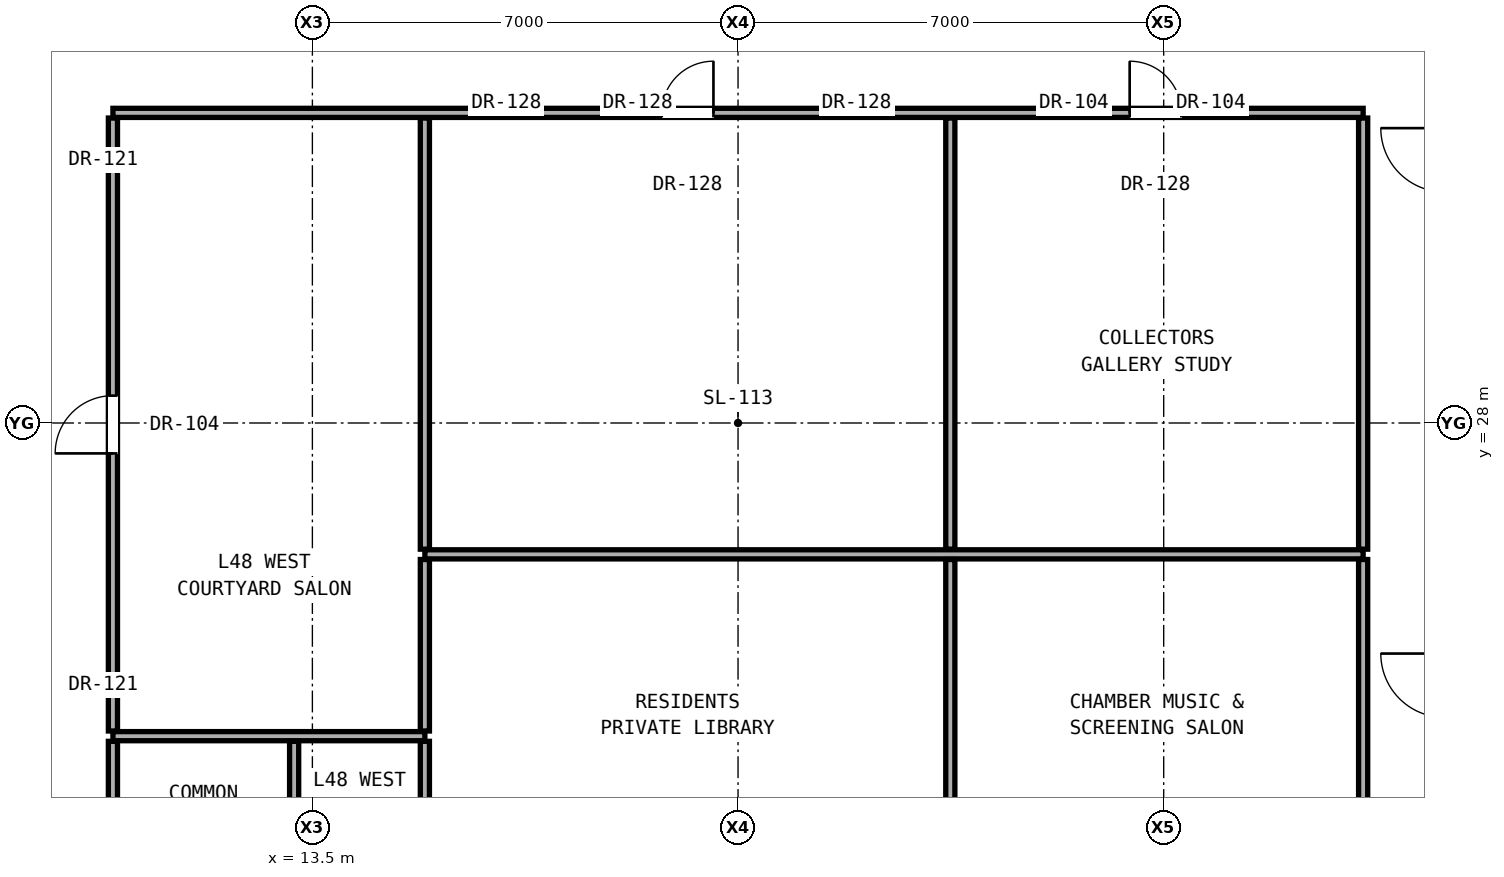
"""IFC4 building model, lengths in metres.
Left out: names, types, materials, properties, quantities, classifications, styles, units other than length and angle.
Written with IfcOpenShell. Run it as: python <this file> out.ifc"""

import sys

from ifc_helpers import new_model, si_unit, direction, frame, frame_2d, origin, place, context, subcontext, project, spatial, rectangle, extrude, element, fill, save


model = new_model("IFC4")
c1 = context("Model", 3, precision=1e-05, world=origin(), true_north=direction((0.0, 1.0)))
c2 = subcontext(c1, "Body", "Model", "MODEL_VIEW")
j1 = project(units=[si_unit("LENGTHUNIT", "METRE"), si_unit("PLANEANGLEUNIT", "RADIAN")], contexts=[c1])
p1 = place(None, origin())
s1 = spatial("IfcSite", under=j1, at=p1, CompositionType="ELEMENT")
p2 = place(p1, origin())
s2 = spatial("IfcBuilding", under=s1, at=p2, CompositionType="ELEMENT")
p3 = place(p2, frame((0.0, 0.0, 170.65)))
s3 = spatial("IfcBuildingStorey", under=s2, at=p3, CompositionType="ELEMENT", Elevation=170.65)
p4 = place(p3, frame((10.22, 22.85, 0.0), z_axis=(0.0, 0.0, 1.0), x_axis=(1.0, 0.0, 0.0)))
e1 = element("IfcWall", 1, at=p4, inside=s3, PredefinedType="PARTITIONING", context=c2, shape_type="SweptSolid", body=[
    extrude(rectangle(XDim=5.13, YDim=0.15, at=frame_2d((2.565, 0.0))), origin(), (0.0, 0.0, 1.0), 2.186),
])
p5 = place(p3, frame((15.35, 25.84, 0.0), z_axis=(0.0, 0.0, 1.0), x_axis=(1.0, 0.0, 0.0)))
e2 = element("IfcWall", 2, at=p5, inside=s3, PredefinedType="PARTITIONING", context=c2, shape_type="SweptSolid", body=[
    extrude(rectangle(XDim=15.43, YDim=0.15, at=frame_2d((7.715, 0.0))), origin(), (0.0, 0.0, 1.0), 2.186),
])
p6 = place(p3, frame((10.22, 33.1, 0.0), z_axis=(0.0, 0.0, 1.0), x_axis=(1.0, 0.0, 0.0)))
e3 = element("IfcWall", 3, at=p6, inside=s3, PredefinedType="PARTITIONING", context=c2, shape_type="SweptSolid", body=[
    extrude(rectangle(XDim=20.56, YDim=0.15, at=frame_2d((10.28, 0.0))), origin(), (0.0, 0.0, 1.0), 2.186),
])
p7 = place(p6, frame((9.025, 0.0, 0.0)))
e4 = element("IfcOpeningElement", 4, at=p7, cuts=e3, PredefinedType="OPENING", context=c2, shape_type="SweptSolid", body=[
    extrude(rectangle(XDim=0.85, YDim=2.01, at=frame_2d((0.425, 1.005))), frame((0.0, 0.085, 0.0), z_axis=(0.0, -1.0, 0.0), x_axis=(1.0, 0.0, 0.0)), (0.0, 0.0, 1.0), 0.17),
])
p8 = place(p6, frame((16.72, 0.0, 0.0)))
e5 = element("IfcOpeningElement", 5, at=p8, cuts=e3, PredefinedType="OPENING", context=c2, shape_type="SweptSolid", body=[
    extrude(rectangle(XDim=0.85, YDim=2.01, at=frame_2d((0.425, 1.005))), frame((0.0, 0.085, 0.0), z_axis=(0.0, -1.0, 0.0), x_axis=(1.0, 0.0, 0.0)), (0.0, 0.0, 1.0), 0.17),
])
p9 = place(p3, frame((10.22, 19.985, 0.0), z_axis=(0.0, 0.0, 1.0), x_axis=(0.0, 1.0, 0.0)))
e6 = element("IfcWall", 6, at=p9, inside=s3, PredefinedType="PARTITIONING", context=c2, shape_type="SweptSolid", body=[
    extrude(rectangle(XDim=2.78, YDim=0.15, at=frame_2d((1.39, 0.0))), origin(), (0.0, 0.0, 1.0), 3.05),
])
p10 = place(p3, frame((10.22, 22.935, 0.0), z_axis=(0.0, 0.0, 1.0), x_axis=(0.0, 1.0, 0.0)))
e7 = element("IfcWall", 7, at=p10, inside=s3, PredefinedType="PARTITIONING", context=c2, shape_type="SweptSolid", body=[
    extrude(rectangle(XDim=10.08, YDim=0.15, at=frame_2d((5.04, 0.0))), origin(), (0.0, 0.0, 1.0), 2.346),
])
p11 = place(p10, frame((4.565, 0.0, 0.0)))
e8 = element("IfcOpeningElement", 8, at=p11, cuts=e7, PredefinedType="OPENING", context=c2, shape_type="SweptSolid", body=[
    extrude(rectangle(XDim=0.95, YDim=2.15, at=frame_2d((0.475, 1.075))), frame((0.0, 0.085, 0.0), z_axis=(0.0, -1.0, 0.0), x_axis=(1.0, 0.0, 0.0)), (0.0, 0.0, 1.0), 0.17),
])
for number, where, z_axis, x_axis in (
    (9, (13.2, 19.985, 0.0), (0.0, 0.0, 1.0), (0.0, 1.0, 0.0)),
    (10, (15.35, 19.985, 0.0), (0.0, 0.0, 1.0), (0.0, 1.0, 0.0)),
):
    element("IfcWall", number, at=place(p3, frame(where, z_axis=z_axis, x_axis=x_axis)), inside=s3, PredefinedType="PARTITIONING", context=c2, shape_type="SweptSolid", body=[
        extrude(rectangle(XDim=2.78, YDim=0.15, at=frame_2d((1.39, 0.0))), origin(), (0.0, 0.0, 1.0), 3.05),
    ])
p12 = place(p3, frame((15.35, 22.935, 0.0), z_axis=(0.0, 0.0, 1.0), x_axis=(0.0, 1.0, 0.0)))
e11 = element("IfcWall", 11, at=p12, inside=s3, PredefinedType="PARTITIONING", context=c2, shape_type="SweptSolid", body=[
    extrude(rectangle(XDim=2.82, YDim=0.15, at=frame_2d((1.41, 0.0))), origin(), (0.0, 0.0, 1.0), 2.186),
])
p13 = place(p3, frame((15.35, 25.925, 0.0), z_axis=(0.0, 0.0, 1.0), x_axis=(0.0, 1.0, 0.0)))
e12 = element("IfcWall", 12, at=p13, inside=s3, PredefinedType="PARTITIONING", context=c2, shape_type="SweptSolid", body=[
    extrude(rectangle(XDim=7.09, YDim=0.15, at=frame_2d((3.545, 0.0))), origin(), (0.0, 0.0, 1.0), 2.186),
])
p14 = place(p3, frame((23.991, 19.985, 0.0), z_axis=(0.0, 0.0, 1.0), x_axis=(0.0, 1.0, 0.0)))
e13 = element("IfcWall", 13, at=p14, inside=s3, PredefinedType="PARTITIONING", context=c2, shape_type="SweptSolid", body=[
    extrude(rectangle(XDim=5.77, YDim=0.15, at=frame_2d((2.885, 0.0))), origin(), (0.0, 0.0, 1.0), 2.186),
])
p15 = place(p3, frame((23.991, 25.925, 0.0), z_axis=(0.0, 0.0, 1.0), x_axis=(0.0, 1.0, 0.0)))
e14 = element("IfcWall", 14, at=p15, inside=s3, PredefinedType="PARTITIONING", context=c2, shape_type="SweptSolid", body=[
    extrude(rectangle(XDim=7.09, YDim=0.15, at=frame_2d((3.545, 0.0))), origin(), (0.0, 0.0, 1.0), 2.186),
])
p16 = place(p3, frame((30.78, 19.985, 0.0), z_axis=(0.0, 0.0, 1.0), x_axis=(0.0, 1.0, 0.0)))
e15 = element("IfcWall", 15, at=p16, inside=s3, PredefinedType="PARTITIONING", context=c2, shape_type="SweptSolid", body=[
    extrude(rectangle(XDim=5.77, YDim=0.15, at=frame_2d((2.885, 0.0))), origin(), (0.0, 0.0, 1.0), 2.346),
])
p17 = place(p3, frame((30.78, 25.925, 0.0), z_axis=(0.0, 0.0, 1.0), x_axis=(0.0, 1.0, 0.0)))
e16 = element("IfcWall", 16, at=p17, inside=s3, PredefinedType="PARTITIONING", context=c2, shape_type="SweptSolid", body=[
    extrude(rectangle(XDim=7.09, YDim=0.15, at=frame_2d((3.545, 0.0))), origin(), (0.0, 0.0, 1.0), 2.346),
])
p18 = place(p11, origin())
e17 = element("IfcDoor", 17, at=p18, inside=s3, OperationType="SINGLE_SWING_LEFT", PredefinedType="DOOR", context=c2, shape_type="SweptSolid", body=[
    extrude(rectangle(XDim=0.95, YDim=2.15, at=frame_2d((0.475, 1.075))), frame((0.0, 0.025, 0.0), z_axis=(0.0, -1.0, 0.0), x_axis=(1.0, 0.0, 0.0)), (0.0, 0.0, 1.0), 0.05),
])
fill(e8, e17)
p19 = place(p7, origin())
e18 = element("IfcDoor", 18, at=p19, inside=s3, OperationType="SINGLE_SWING_RIGHT", PredefinedType="DOOR", context=c2, shape_type="SweptSolid", body=[
    extrude(rectangle(XDim=0.85, YDim=2.01, at=frame_2d((0.425, 1.005))), frame((0.0, 0.025, 0.0), z_axis=(0.0, -1.0, 0.0), x_axis=(1.0, 0.0, 0.0)), (0.0, 0.0, 1.0), 0.05),
])
fill(e4, e18)
p20 = place(p8, origin())
e19 = element("IfcDoor", 19, at=p20, inside=s3, OperationType="SINGLE_SWING_LEFT", PredefinedType="DOOR", context=c2, shape_type="SweptSolid", body=[
    extrude(rectangle(XDim=0.85, YDim=2.01, at=frame_2d((0.425, 1.005))), frame((0.0, 0.025, 0.0), z_axis=(0.0, -1.0, 0.0), x_axis=(1.0, 0.0, 0.0)), (0.0, 0.0, 1.0), 0.05),
])
fill(e5, e19)
save(model, sys.argv[1])
